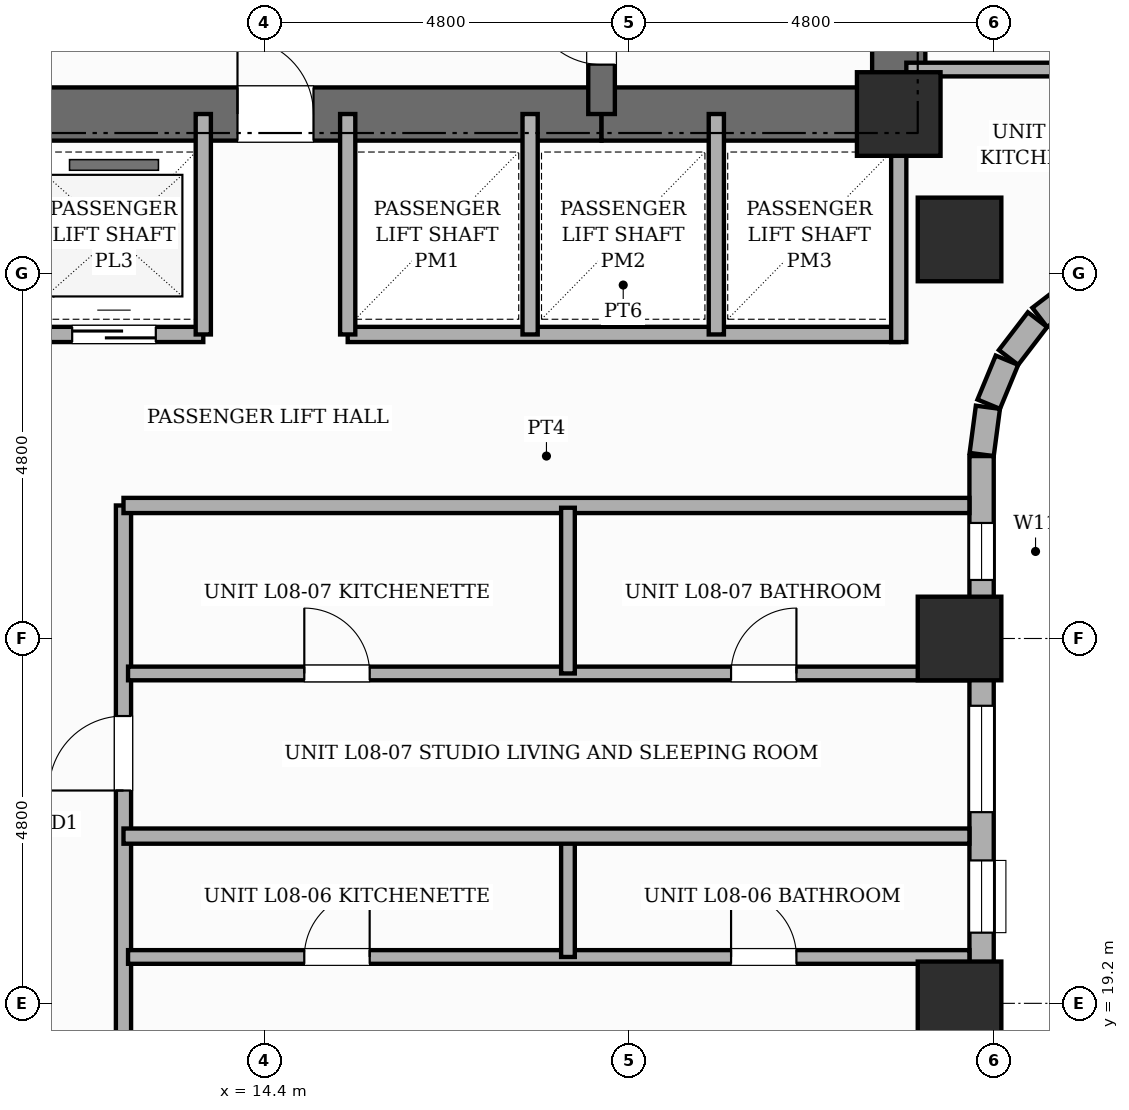
"""IFC4 building model, lengths in metres.
Left out: names, types, materials, properties, quantities, classifications, styles, units other than length and angle.
Written with IfcOpenShell. Run it as: python <this file> out.ifc"""

import sys

from ifc_helpers import new_model, si_unit, direction, frame, frame_2d, origin, origin_2d, place, context, subcontext, project, spatial, rectangle, extrude, element, fill, save


model = new_model("IFC4")
c1 = context("Model", 3, precision=1e-05, world=origin(), true_north=direction((0.0, 1.0)))
c2 = subcontext(c1, "Body", "Model", "MODEL_VIEW")
j1 = project(units=[si_unit("LENGTHUNIT", "METRE"), si_unit("PLANEANGLEUNIT", "RADIAN")], contexts=[c1])
p1 = place(None, origin())
s1 = spatial("IfcSite", under=j1, at=p1, CompositionType="ELEMENT")
p2 = place(p1, origin())
s2 = spatial("IfcBuilding", under=s1, at=p2, CompositionType="ELEMENT")
p3 = place(p2, frame((0.0, 0.0, 35.8)))
s3 = spatial("IfcBuildingStorey", under=s2, at=p3, CompositionType="ELEMENT", Elevation=35.8)
p4 = place(p3, frame((22.75, 30.55, 0.0), z_axis=(0.0, 0.0, 1.0), x_axis=(0.0, 1.0, 0.0)))
e1 = element("IfcWall", 1, at=p4, inside=s3, PredefinedType="SHEAR", context=c2, shape_type="SweptSolid", body=[
    extrude(rectangle(XDim=15.6, YDim=0.7, at=frame_2d((7.8, 0.0))), origin(), (0.0, 0.0, 1.0), 3.6),
])
p5 = place(p4, frame((10.8, 0.0, 0.0)))
e2 = element("IfcOpeningElement", 2, at=p5, cuts=e1, PredefinedType="OPENING", context=c2, shape_type="SweptSolid", body=[
    extrude(rectangle(XDim=1.0, YDim=2.15, at=frame_2d((0.5, 1.075))), frame((0.0, 0.36, 0.0), z_axis=(0.0, -1.0, 0.0), x_axis=(1.0, 0.0, 0.0)), (0.0, 0.0, 1.0), 0.72),
])
p6 = place(p3, frame((9.96, 30.9, 0.0), z_axis=(0.0, 0.0, 1.0), x_axis=(1.0, 0.0, 0.0)))
e3 = element("IfcWall", 3, at=p6, inside=s3, PredefinedType="SHEAR", context=c2, shape_type="SweptSolid", body=[
    extrude(rectangle(XDim=8.88, YDim=0.7, at=frame_2d((4.44, 0.0))), origin(), (0.0, 0.0, 1.0), 3.6),
])
p7 = place(p6, frame((4.09, 0.0, 0.0)))
e4 = element("IfcOpeningElement", 4, at=p7, cuts=e3, PredefinedType="OPENING", context=c2, shape_type="SweptSolid", body=[
    extrude(rectangle(XDim=1.0, YDim=2.15, at=frame_2d((0.5, 1.075))), frame((0.0, 0.36, 0.0), z_axis=(0.0, -1.0, 0.0), x_axis=(1.0, 0.0, 0.0)), (0.0, 0.0, 1.0), 0.72),
])
p8 = place(p3, frame((18.84, 30.9, 0.0), z_axis=(0.0, 0.0, 1.0), x_axis=(1.0, 0.0, 0.0)))
e5 = element("IfcWall", 5, at=p8, inside=s3, PredefinedType="SHEAR", context=c2, shape_type="SweptSolid", body=[
    extrude(rectangle(XDim=3.91, YDim=0.7, at=frame_2d((1.955, 0.0))), origin(), (0.0, 0.0, 1.0), 3.6),
])
p9 = place(p3, frame((18.84, 30.9, 0.0), z_axis=(0.0, 0.0, 1.0), x_axis=(0.0, 1.0, 0.0)))
e6 = element("IfcWall", 6, at=p9, inside=s3, PredefinedType="SHEAR", context=c2, shape_type="SweptSolid", body=[
    extrude(rectangle(XDim=14.9, YDim=0.35, at=frame_2d((7.45, 0.0))), origin(), (0.0, 0.0, 1.0), 3.6),
])
p10 = place(p9, frame((0.65, 0.0, 0.0)))
e7 = element("IfcOpeningElement", 7, at=p10, cuts=e6, PredefinedType="OPENING", context=c2, shape_type="SweptSolid", body=[
    extrude(rectangle(XDim=0.95, YDim=2.1, at=frame_2d((0.475, 1.05))), frame((0.0, 0.185, 0.0), z_axis=(0.0, -1.0, 0.0), x_axis=(1.0, 0.0, 0.0)), (0.0, 0.0, 1.0), 0.37),
])
p11 = place(p9, frame((10.45, 0.0, 0.0)))
e8 = element("IfcOpeningElement", 8, at=p11, cuts=e6, PredefinedType="OPENING", context=c2, shape_type="SweptSolid", body=[
    extrude(rectangle(XDim=1.0, YDim=2.15, at=frame_2d((0.5, 1.075))), frame((0.0, 0.185, 0.0), z_axis=(0.0, -1.0, 0.0), x_axis=(1.0, 0.0, 0.0)), (0.0, 0.0, 1.0), 0.37),
])
for number, where, z_axis, x_axis in (
    (9, (22.75, 30.9, 0.0), (0.0, 0.0, 1.0), (1.0, 0.0, 0.0)),
    (10, (23.55, 19.2, 0.0), (0.0, 0.0, 1.0), (1.0, 0.0, 0.0)),
    (11, (23.55, 24.0, 0.0), (0.0, 0.0, 1.0), (1.0, 0.0, 0.0)),
    (12, (23.55, 29.25, 0.0), (0.0, 0.0, 1.0), (1.0, 0.0, 0.0)),
):
    element("IfcColumn", number, at=place(p3, frame(where, z_axis=z_axis, x_axis=x_axis)), inside=s3, PredefinedType="COLUMN", context=c2, shape_type="SweptSolid", body=[
        extrude(rectangle(XDim=1.1, YDim=1.1, at=origin_2d()), origin(), (0.0, 0.0, 1.0), 3.6),
    ])
for number, where, z_axis, x_axis in (
    (13, (25.103, 28.605, 0.0), (0.0, 0.0, 1.0), (-0.793, -0.609, 0.0)),
    (14, (24.576, 28.195, 0.0), (0.0, 0.0, 1.0), (-0.609, -0.793, 0.0)),
):
    element("IfcWall", number, at=place(p3, frame(where, z_axis=z_axis, x_axis=x_axis)), inside=s3, PredefinedType="STANDARD", context=c2, shape_type="SweptSolid", body=[
        extrude(rectangle(XDim=0.626, YDim=0.32, at=frame_2d((0.313, 0.0))), origin(), (0.0, 0.0, 1.0), 3.35),
    ])
p12 = place(p3, frame((24.174, 27.661, 0.0), z_axis=(0.0, 0.0, 1.0), x_axis=(-0.382455093999, -0.923974080304, 0.0)))
e15 = element("IfcWall", 15, at=p12, inside=s3, PredefinedType="STANDARD", context=c2, shape_type="SweptSolid", body=[
    extrude(rectangle(XDim=0.626, YDim=0.32, at=frame_2d((0.313, 0.0))), origin(), (0.0, 0.0, 1.0), 3.35),
])
p13 = place(p3, frame((23.923, 27.042, 0.0), z_axis=(0.0, 0.0, 1.0), x_axis=(-0.130555323746, -0.9914410257, 0.0)))
e16 = element("IfcWall", 16, at=p13, inside=s3, PredefinedType="STANDARD", context=c2, shape_type="SweptSolid", body=[
    extrude(rectangle(XDim=0.626, YDim=0.32, at=frame_2d((0.313, 0.0))), origin(), (0.0, 0.0, 1.0), 2.53),
])
p14 = place(p3, frame((23.84, 26.4, 0.0), z_axis=(0.0, 0.0, 1.0), x_axis=(0.0, -1.0, 0.0)))
e17 = element("IfcWall", 17, at=p14, inside=s3, PredefinedType="STANDARD", context=c2, shape_type="SweptSolid", body=[
    extrude(rectangle(XDim=19.2, YDim=0.32, at=frame_2d((9.6, 0.0))), origin(), (0.0, 0.0, 1.0), 2.53),
])
p15 = place(p14, frame((15.415, 0.0, 0.45)))
e18 = element("IfcOpeningElement", 18, at=p15, cuts=e17, PredefinedType="OPENING", context=c2, shape_type="SweptSolid", body=[
    extrude(rectangle(XDim=0.6, YDim=1.8, at=frame_2d((0.3, 0.9))), frame((0.0, 0.17, 0.0), z_axis=(0.0, -1.0, 0.0), x_axis=(1.0, 0.0, 0.0)), (0.0, 0.0, 1.0), 0.34),
])
p16 = place(p14, frame((13.43, 0.0, 0.65)))
e19 = element("IfcOpeningElement", 19, at=p16, cuts=e17, PredefinedType="OPENING", context=c2, shape_type="SweptSolid", body=[
    extrude(rectangle(XDim=1.4, YDim=1.1, at=frame_2d((0.7, 0.55))), frame((0.0, 0.17, 0.0), z_axis=(0.0, -1.0, 0.0), x_axis=(1.0, 0.0, 0.0)), (0.0, 0.0, 1.0), 0.34),
])
p17 = place(p14, frame((8.21, 0.0, 0.45)))
e20 = element("IfcOpeningElement", 20, at=p17, cuts=e17, PredefinedType="OPENING", context=c2, shape_type="SweptSolid", body=[
    extrude(rectangle(XDim=0.95, YDim=1.8, at=frame_2d((0.475, 0.9))), frame((0.0, 0.17, 0.0), z_axis=(0.0, -1.0, 0.0), x_axis=(1.0, 0.0, 0.0)), (0.0, 0.0, 1.0), 0.34),
])
p18 = place(p14, frame((3.285, 0.0, 0.65)))
e21 = element("IfcOpeningElement", 21, at=p18, cuts=e17, PredefinedType="OPENING", context=c2, shape_type="SweptSolid", body=[
    extrude(rectangle(XDim=1.4, YDim=1.1, at=frame_2d((0.7, 0.55))), frame((0.0, 0.17, 0.0), z_axis=(0.0, -1.0, 0.0), x_axis=(1.0, 0.0, 0.0)), (0.0, 0.0, 1.0), 0.34),
])
p19 = place(p14, frame((10.04, 0.0, 0.45)))
e22 = element("IfcOpeningElement", 22, at=p19, cuts=e17, PredefinedType="OPENING", context=c2, shape_type="SweptSolid", body=[
    extrude(rectangle(XDim=0.95, YDim=1.8, at=frame_2d((0.475, 0.9))), frame((0.0, 0.17, 0.0), z_axis=(0.0, -1.0, 0.0), x_axis=(1.0, 0.0, 0.0)), (0.0, 0.0, 1.0), 0.34),
])
p20 = place(p14, frame((5.32, 0.0, 0.45)))
e23 = element("IfcOpeningElement", 23, at=p20, cuts=e17, PredefinedType="OPENING", context=c2, shape_type="SweptSolid", body=[
    extrude(rectangle(XDim=0.95, YDim=1.8, at=frame_2d((0.475, 0.9))), frame((0.0, 0.17, 0.0), z_axis=(0.0, -1.0, 0.0), x_axis=(1.0, 0.0, 0.0)), (0.0, 0.0, 1.0), 0.34),
])
p21 = place(p14, frame((0.88, 0.0, 0.45)))
e24 = element("IfcOpeningElement", 24, at=p21, cuts=e17, PredefinedType="OPENING", context=c2, shape_type="SweptSolid", body=[
    extrude(rectangle(XDim=0.75, YDim=1.8, at=frame_2d((0.375, 0.9))), frame((0.0, 0.17, 0.0), z_axis=(0.0, -1.0, 0.0), x_axis=(1.0, 0.0, 0.0)), (0.0, 0.0, 1.0), 0.34),
])
p22 = place(p3, frame((6.05, 28.0, 0.0), z_axis=(0.0, 0.0, 1.0), x_axis=(1.0, 0.0, 0.0)))
e25 = element("IfcWall", 25, at=p22, inside=s3, PredefinedType="POLYGONAL", context=c2, shape_type="SweptSolid", body=[
    extrude(rectangle(XDim=7.55, YDim=0.2, at=frame_2d((3.775, 0.0))), origin(), (0.0, 0.0, 1.0), 3.35),
])
p23 = place(p22, frame((0.925, 0.0, 0.0)))
e26 = element("IfcOpeningElement", 26, at=p23, cuts=e25, PredefinedType="OPENING", context=c2, shape_type="SweptSolid", body=[
    extrude(rectangle(XDim=1.1, YDim=2.15, at=frame_2d((0.55, 1.075))), frame((0.0, 0.11, 0.0), z_axis=(0.0, -1.0, 0.0), x_axis=(1.0, 0.0, 0.0)), (0.0, 0.0, 1.0), 0.22),
])
p24 = place(p22, frame((3.375, 0.0, 0.0)))
e27 = element("IfcOpeningElement", 27, at=p24, cuts=e25, PredefinedType="OPENING", context=c2, shape_type="SweptSolid", body=[
    extrude(rectangle(XDim=1.1, YDim=2.15, at=frame_2d((0.55, 1.075))), frame((0.0, 0.11, 0.0), z_axis=(0.0, -1.0, 0.0), x_axis=(1.0, 0.0, 0.0)), (0.0, 0.0, 1.0), 0.22),
])
p25 = place(p22, frame((5.825, 0.0, 0.0)))
e28 = element("IfcOpeningElement", 28, at=p25, cuts=e25, PredefinedType="OPENING", context=c2, shape_type="SweptSolid", body=[
    extrude(rectangle(XDim=1.1, YDim=2.15, at=frame_2d((0.55, 1.075))), frame((0.0, 0.11, 0.0), z_axis=(0.0, -1.0, 0.0), x_axis=(1.0, 0.0, 0.0)), (0.0, 0.0, 1.0), 0.22),
])
p26 = place(p3, frame((15.5, 28.0, 0.0), z_axis=(0.0, 0.0, 1.0), x_axis=(1.0, 0.0, 0.0)))
e29 = element("IfcWall", 29, at=p26, inside=s3, PredefinedType="POLYGONAL", context=c2, shape_type="SweptSolid", body=[
    extrude(rectangle(XDim=7.25, YDim=0.2, at=frame_2d((3.625, 0.0))), origin(), (0.0, 0.0, 1.0), 3.35),
])
p27 = place(p3, frame((22.75, 27.9, 0.0), z_axis=(0.0, 0.0, 1.0), x_axis=(0.0, 1.0, 0.0)))
e30 = element("IfcWall", 30, at=p27, inside=s3, PredefinedType="POLYGONAL", context=c2, shape_type="SweptSolid", body=[
    extrude(rectangle(XDim=3.0, YDim=0.2, at=frame_2d((1.5, 0.0))), origin(), (0.0, 0.0, 1.0), 3.35),
])
for number, where, z_axis, x_axis in (
    (31, (13.6, 28.0, 0.0), (0.0, 0.0, 1.0), (0.0, 1.0, 0.0)),
    (32, (15.5, 28.0, 0.0), (0.0, 0.0, 1.0), (0.0, 1.0, 0.0)),
    (33, (17.9, 28.0, 0.0), (0.0, 0.0, 1.0), (0.0, 1.0, 0.0)),
    (34, (20.35, 28.0, 0.0), (0.0, 0.0, 1.0), (0.0, 1.0, 0.0)),
):
    element("IfcWall", number, at=place(p3, frame(where, z_axis=z_axis, x_axis=x_axis)), inside=s3, PredefinedType="POLYGONAL", context=c2, shape_type="SweptSolid", body=[
        extrude(rectangle(XDim=2.9, YDim=0.2, at=frame_2d((1.45, 0.0))), origin(), (0.0, 0.0, 1.0), 3.35),
    ])
p28 = place(p3, frame((12.55, 5.12, 0.0), z_axis=(0.0, 0.0, 1.0), x_axis=(0.0, 1.0, 0.0)))
e35 = element("IfcWall", 35, at=p28, inside=s3, PredefinedType="PARTITIONING", context=c2, shape_type="SweptSolid", body=[
    extrude(rectangle(XDim=20.63, YDim=0.2, at=frame_2d((10.315, 0.0))), origin(), (0.0, 0.0, 1.0), 3.35),
])
p29 = place(p28, frame((1.004, 0.0, 0.0)))
e36 = element("IfcOpeningElement", 36, at=p29, cuts=e35, PredefinedType="OPENING", context=c2, shape_type="SweptSolid", body=[
    extrude(rectangle(XDim=0.98, YDim=2.18, at=frame_2d((0.49, 1.09))), frame((0.0, 0.11, 0.0), z_axis=(0.0, -1.0, 0.0), x_axis=(1.0, 0.0, 0.0)), (0.0, 0.0, 1.0), 0.22),
])
p30 = place(p28, frame((6.68, 0.0, 0.0)))
e37 = element("IfcOpeningElement", 37, at=p30, cuts=e35, PredefinedType="OPENING", context=c2, shape_type="SweptSolid", body=[
    extrude(rectangle(XDim=0.98, YDim=2.18, at=frame_2d((0.49, 1.09))), frame((0.0, 0.11, 0.0), z_axis=(0.0, -1.0, 0.0), x_axis=(1.0, 0.0, 0.0)), (0.0, 0.0, 1.0), 0.22),
])
p31 = place(p28, frame((12.715, 0.0, 0.0)))
e38 = element("IfcOpeningElement", 38, at=p31, cuts=e35, PredefinedType="OPENING", context=c2, shape_type="SweptSolid", body=[
    extrude(rectangle(XDim=0.98, YDim=2.18, at=frame_2d((0.49, 1.09))), frame((0.0, 0.11, 0.0), z_axis=(0.0, -1.0, 0.0), x_axis=(1.0, 0.0, 0.0)), (0.0, 0.0, 1.0), 0.22),
])
p32 = place(p28, frame((16.88, 0.0, 0.0)))
e39 = element("IfcOpeningElement", 39, at=p32, cuts=e35, PredefinedType="OPENING", context=c2, shape_type="SweptSolid", body=[
    extrude(rectangle(XDim=0.98, YDim=2.18, at=frame_2d((0.49, 1.09))), frame((0.0, 0.11, 0.0), z_axis=(0.0, -1.0, 0.0), x_axis=(1.0, 0.0, 0.0)), (0.0, 0.0, 1.0), 0.22),
])
p33 = place(p3, frame((12.55, 25.75, 0.0), z_axis=(0.0, 0.0, 1.0), x_axis=(1.0, 0.0, 0.0)))
e40 = element("IfcWall", 40, at=p33, inside=s3, PredefinedType="PARTITIONING", context=c2, shape_type="SweptSolid", body=[
    extrude(rectangle(XDim=11.13, YDim=0.2, at=frame_2d((5.565, 0.0))), origin(), (0.0, 0.0, 1.0), 3.35),
])
p34 = place(p3, frame((12.61, 19.81, 0.0), z_axis=(0.0, 0.0, 1.0), x_axis=(1.0, 0.0, 0.0)))
e41 = element("IfcWall", 41, at=p34, inside=s3, PredefinedType="PLUMBINGWALL", context=c2, shape_type="SweptSolid", body=[
    extrude(rectangle(XDim=11.07, YDim=0.18, at=frame_2d((5.535, 0.0))), origin(), (0.0, 0.0, 1.0), 3.35),
])
p35 = place(p34, frame((2.319, 0.0, 0.0)))
e42 = element("IfcOpeningElement", 42, at=p35, cuts=e41, PredefinedType="OPENING", context=c2, shape_type="SweptSolid", body=[
    extrude(rectangle(XDim=0.86, YDim=2.1, at=frame_2d((0.43, 1.05))), frame((0.0, 0.1, 0.0), z_axis=(0.0, -1.0, 0.0), x_axis=(1.0, 0.0, 0.0)), (0.0, 0.0, 1.0), 0.2),
])
p36 = place(p34, frame((7.934, 0.0, 0.0)))
e43 = element("IfcOpeningElement", 43, at=p36, cuts=e41, PredefinedType="OPENING", context=c2, shape_type="SweptSolid", body=[
    extrude(rectangle(XDim=0.86, YDim=2.1, at=frame_2d((0.43, 1.05))), frame((0.0, 0.1, 0.0), z_axis=(0.0, -1.0, 0.0), x_axis=(1.0, 0.0, 0.0)), (0.0, 0.0, 1.0), 0.2),
])
p37 = place(p3, frame((18.398, 19.81, 0.0), z_axis=(0.0, 0.0, 1.0), x_axis=(0.0, 1.0, 0.0)))
e44 = element("IfcWall", 44, at=p37, inside=s3, PredefinedType="PLUMBINGWALL", context=c2, shape_type="SweptSolid", body=[
    extrude(rectangle(XDim=1.63, YDim=0.18, at=frame_2d((0.815, 0.0))), origin(), (0.0, 0.0, 1.0), 3.35),
])
p38 = place(p3, frame((12.55, 21.4, 0.0), z_axis=(0.0, 0.0, 1.0), x_axis=(1.0, 0.0, 0.0)))
e45 = element("IfcWall", 45, at=p38, inside=s3, PredefinedType="SOLIDWALL", context=c2, shape_type="SweptSolid", body=[
    extrude(rectangle(XDim=11.13, YDim=0.2, at=frame_2d((5.565, 0.0))), origin(), (0.0, 0.0, 1.0), 3.35),
])
p39 = place(p3, frame((12.61, 23.54, 0.0), z_axis=(0.0, 0.0, 1.0), x_axis=(1.0, 0.0, 0.0)))
e46 = element("IfcWall", 46, at=p39, inside=s3, PredefinedType="PLUMBINGWALL", context=c2, shape_type="SweptSolid", body=[
    extrude(rectangle(XDim=11.07, YDim=0.18, at=frame_2d((5.535, 0.0))), origin(), (0.0, 0.0, 1.0), 3.35),
])
p40 = place(p39, frame((2.319, 0.0, 0.0)))
e47 = element("IfcOpeningElement", 47, at=p40, cuts=e46, PredefinedType="OPENING", context=c2, shape_type="SweptSolid", body=[
    extrude(rectangle(XDim=0.86, YDim=2.1, at=frame_2d((0.43, 1.05))), frame((0.0, 0.1, 0.0), z_axis=(0.0, -1.0, 0.0), x_axis=(1.0, 0.0, 0.0)), (0.0, 0.0, 1.0), 0.2),
])
p41 = place(p39, frame((7.934, 0.0, 0.0)))
e48 = element("IfcOpeningElement", 48, at=p41, cuts=e46, PredefinedType="OPENING", context=c2, shape_type="SweptSolid", body=[
    extrude(rectangle(XDim=0.86, YDim=2.1, at=frame_2d((0.43, 1.05))), frame((0.0, 0.1, 0.0), z_axis=(0.0, -1.0, 0.0), x_axis=(1.0, 0.0, 0.0)), (0.0, 0.0, 1.0), 0.2),
])
p42 = place(p3, frame((18.398, 23.54, 0.0), z_axis=(0.0, 0.0, 1.0), x_axis=(0.0, 1.0, 0.0)))
e49 = element("IfcWall", 49, at=p42, inside=s3, PredefinedType="PLUMBINGWALL", context=c2, shape_type="SweptSolid", body=[
    extrude(rectangle(XDim=2.18, YDim=0.18, at=frame_2d((1.09, 0.0))), origin(), (0.0, 0.0, 1.0), 3.35),
])
p43 = place(p3, frame((22.85, 31.485, 0.0), z_axis=(0.0, 0.0, 1.0), x_axis=(1.0, 0.0, 0.0)))
e50 = element("IfcWall", 50, at=p43, inside=s3, PredefinedType="PLUMBINGWALL", context=c2, shape_type="SweptSolid", body=[
    extrude(rectangle(XDim=3.892, YDim=0.18, at=frame_2d((1.946, 0.0))), origin(), (0.0, 0.0, 1.0), 3.35),
])
p44 = place(p18, origin())
e51 = element("IfcWindow", 51, at=p44, inside=s3, PartitioningType="SINGLE_PANEL", PredefinedType="WINDOW", context=c2, shape_type="SweptSolid", body=[
    extrude(rectangle(XDim=1.4, YDim=1.1, at=frame_2d((0.7, 0.55))), frame((0.0, 0.03, 0.0), z_axis=(0.0, -1.0, 0.0), x_axis=(1.0, 0.0, 0.0)), (0.0, 0.0, 1.0), 0.06),
])
fill(e21, e51)
p45 = place(p20, origin())
e52 = element("IfcWindow", 52, at=p45, inside=s3, PartitioningType="SINGLE_PANEL", PredefinedType="WINDOW", context=c2, shape_type="SweptSolid", body=[
    extrude(rectangle(XDim=0.95, YDim=1.8, at=frame_2d((0.475, 0.9))), frame((0.0, 0.03, 0.0), z_axis=(0.0, -1.0, 0.0), x_axis=(1.0, 0.0, 0.0)), (0.0, 0.0, 1.0), 0.06),
])
fill(e23, e52)
p46 = place(p21, origin())
e53 = element("IfcWindow", 53, at=p46, inside=s3, PartitioningType="SINGLE_PANEL", PredefinedType="WINDOW", context=c2, shape_type="SweptSolid", body=[
    extrude(rectangle(XDim=0.75, YDim=1.8, at=frame_2d((0.375, 0.9))), frame((0.0, 0.03, 0.0), z_axis=(0.0, -1.0, 0.0), x_axis=(1.0, 0.0, 0.0)), (0.0, 0.0, 1.0), 0.06),
])
fill(e24, e53)
p47 = place(p10, origin())
e54 = element("IfcDoor", 54, at=p47, inside=s3, OperationType="SINGLE_SWING_RIGHT", PredefinedType="DOOR", context=c2, shape_type="SweptSolid", body=[
    extrude(rectangle(XDim=0.95, YDim=2.1, at=frame_2d((0.475, 1.05))), frame((0.0, 0.025, 0.0), z_axis=(0.0, -1.0, 0.0), x_axis=(1.0, 0.0, 0.0)), (0.0, 0.0, 1.0), 0.05),
])
fill(e7, e54)
p48 = place(p7, origin())
e55 = element("IfcDoor", 55, at=p48, inside=s3, OperationType="SINGLE_SWING_LEFT", PredefinedType="DOOR", context=c2, shape_type="SweptSolid", body=[
    extrude(rectangle(XDim=1.0, YDim=2.15, at=frame_2d((0.5, 1.075))), frame((0.0, 0.025, 0.0), z_axis=(0.0, -1.0, 0.0), x_axis=(1.0, 0.0, 0.0)), (0.0, 0.0, 1.0), 0.05),
])
fill(e4, e55)
p49 = place(p25, origin())
e56 = element("IfcDoor", 56, at=p49, inside=s3, OperationType="SLIDING_TO_LEFT", PredefinedType="DOOR", context=c2, shape_type="SweptSolid", body=[
    extrude(rectangle(XDim=1.1, YDim=2.15, at=frame_2d((0.55, 1.075))), frame((0.0, 0.025, 0.0), z_axis=(0.0, -1.0, 0.0), x_axis=(1.0, 0.0, 0.0)), (0.0, 0.0, 1.0), 0.05),
])
fill(e28, e56)
p50 = place(p35, origin())
e57 = element("IfcDoor", 57, at=p50, inside=s3, OperationType="SINGLE_SWING_RIGHT", PredefinedType="DOOR", context=c2, shape_type="SweptSolid", body=[
    extrude(rectangle(XDim=0.86, YDim=2.1, at=frame_2d((0.43, 1.05))), frame((0.0, 0.025, 0.0), z_axis=(0.0, -1.0, 0.0), x_axis=(1.0, 0.0, 0.0)), (0.0, 0.0, 1.0), 0.05),
])
fill(e42, e57)
p51 = place(p36, origin())
e58 = element("IfcDoor", 58, at=p51, inside=s3, OperationType="SINGLE_SWING_LEFT", PredefinedType="DOOR", context=c2, shape_type="SweptSolid", body=[
    extrude(rectangle(XDim=0.86, YDim=2.1, at=frame_2d((0.43, 1.05))), frame((0.0, 0.025, 0.0), z_axis=(0.0, -1.0, 0.0), x_axis=(1.0, 0.0, 0.0)), (0.0, 0.0, 1.0), 0.05),
])
fill(e43, e58)
p52 = place(p32, origin())
e59 = element("IfcDoor", 59, at=p52, inside=s3, OperationType="SINGLE_SWING_LEFT", PredefinedType="DOOR", context=c2, shape_type="SweptSolid", body=[
    extrude(rectangle(XDim=0.98, YDim=2.18, at=frame_2d((0.49, 1.09))), frame((0.0, 0.025, 0.0), z_axis=(0.0, -1.0, 0.0), x_axis=(1.0, 0.0, 0.0)), (0.0, 0.0, 1.0), 0.05),
])
fill(e39, e59)
p53 = place(p40, origin())
e60 = element("IfcDoor", 60, at=p53, inside=s3, OperationType="SINGLE_SWING_LEFT", PredefinedType="DOOR", context=c2, shape_type="SweptSolid", body=[
    extrude(rectangle(XDim=0.86, YDim=2.1, at=frame_2d((0.43, 1.05))), frame((0.0, 0.025, 0.0), z_axis=(0.0, -1.0, 0.0), x_axis=(1.0, 0.0, 0.0)), (0.0, 0.0, 1.0), 0.05),
])
fill(e47, e60)
p54 = place(p41, origin())
e61 = element("IfcDoor", 61, at=p54, inside=s3, OperationType="SINGLE_SWING_RIGHT", PredefinedType="DOOR", context=c2, shape_type="SweptSolid", body=[
    extrude(rectangle(XDim=0.86, YDim=2.1, at=frame_2d((0.43, 1.05))), frame((0.0, 0.025, 0.0), z_axis=(0.0, -1.0, 0.0), x_axis=(1.0, 0.0, 0.0)), (0.0, 0.0, 1.0), 0.05),
])
fill(e48, e61)
save(model, sys.argv[1])
